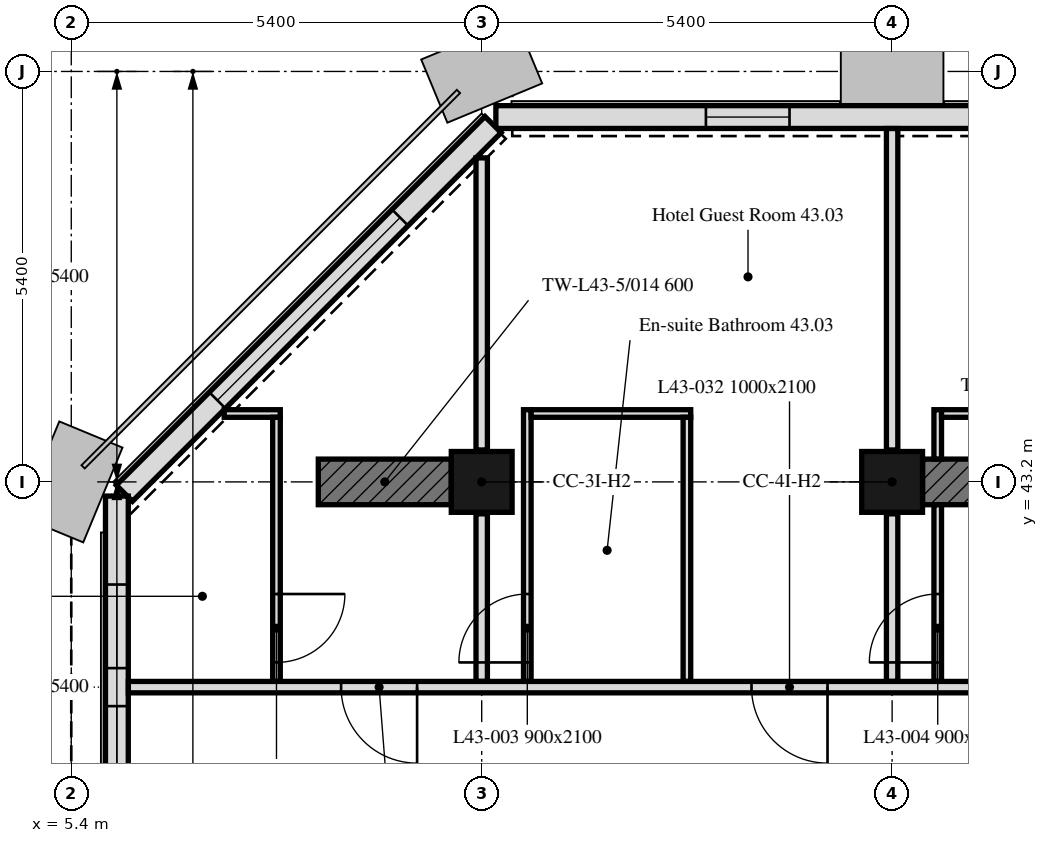
"""IFC4 building model, lengths in metres.
Left out: names, types, materials, properties, quantities, classifications, styles, units other than length and angle.
Written with IfcOpenShell. Run it as: python <this file> out.ifc"""

import sys

from ifc_helpers import new_model, si_unit, direction, frame, frame_2d, origin, origin_2d, place, context, subcontext, project, spatial, rectangle, extrude, element, fill, save


model = new_model("IFC4")
c1 = context("Model", 3, precision=1e-05, world=origin(), true_north=direction((0.0, 1.0)))
c2 = subcontext(c1, "Body", "Model", "MODEL_VIEW")
j1 = project(units=[si_unit("LENGTHUNIT", "METRE"), si_unit("PLANEANGLEUNIT", "RADIAN")], contexts=[c1])
p1 = place(None, origin())
s1 = spatial("IfcSite", under=j1, at=p1, CompositionType="ELEMENT")
p2 = place(p1, origin())
s2 = spatial("IfcBuilding", under=s1, at=p2, CompositionType="ELEMENT")
p3 = place(p2, frame((0.0, 0.0, 180.7)))
s3 = spatial("IfcBuildingStorey", under=s2, at=p3, CompositionType="ELEMENT", Elevation=180.7)
for number, where, z_axis, x_axis in (
    (1, (10.8, 43.2, 0.0), (0.0, 0.0, 1.0), (1.0, 0.0, 0.0)),
    (2, (16.2, 43.2, 0.0), (0.0, 0.0, 1.0), (1.0, 0.0, 0.0)),
):
    element("IfcColumn", number, at=place(p3, frame(where, z_axis=z_axis, x_axis=x_axis)), inside=s3, PredefinedType="COLUMN", context=c2, shape_type="SweptSolid", body=[
        extrude(rectangle(XDim=0.8, YDim=0.8, at=origin_2d()), origin(), (0.0, 0.0, 1.0), 3.0),
    ])
p4 = place(p3, frame((8.65, 43.2, 0.0), z_axis=(0.0, 0.0, 1.0), x_axis=(1.0, 0.0, 0.0)))
e3 = element("IfcWall", 3, at=p4, inside=s3, PredefinedType="SHEAR", context=c2, shape_type="SweptSolid", body=[
    extrude(rectangle(XDim=1.75, YDim=0.6, at=frame_2d((0.875, 0.0))), origin(), (0.0, 0.0, 1.0), 3.0),
])
p5 = place(p3, frame((16.6, 43.2, 0.0), z_axis=(0.0, 0.0, 1.0), x_axis=(1.0, 0.0, 0.0)))
e4 = element("IfcWall", 4, at=p5, inside=s3, PredefinedType="SHEAR", context=c2, shape_type="SweptSolid", body=[
    extrude(rectangle(XDim=1.55, YDim=0.6, at=frame_2d((0.775, 0.0))), origin(), (0.0, 0.0, 1.0), 3.0),
])
p6 = place(p3, frame((43.014, 48.0, 0.0), z_axis=(0.0, 0.0, 1.0), x_axis=(-1.0, 0.0, 0.0)))
e5 = element("IfcWall", 5, at=p6, inside=s3, PredefinedType="SOLIDWALL", context=c2, shape_type="SweptSolid", body=[
    extrude(rectangle(XDim=32.027, YDim=0.3, at=frame_2d((16.014, 0.0))), origin(), (0.0, 0.0, 1.0), 3.0),
])
p7 = place(p6, frame((0.814, 0.0, 0.9)))
e6 = element("IfcOpeningElement", 6, at=p7, cuts=e5, PredefinedType="OPENING", context=c2, shape_type="SweptSolid", body=[
    extrude(rectangle(XDim=3.4, YDim=1.7, at=frame_2d((1.7, 0.85))), frame((0.0, 0.16, 0.0), z_axis=(0.0, -1.0, 0.0), x_axis=(1.0, 0.0, 0.0)), (0.0, 0.0, 1.0), 0.32),
])
p8 = place(p6, frame((7.664, 0.0, 0.9)))
e7 = element("IfcOpeningElement", 7, at=p8, cuts=e5, PredefinedType="OPENING", context=c2, shape_type="SweptSolid", body=[
    extrude(rectangle(XDim=0.5, YDim=1.7, at=frame_2d((0.25, 0.85))), frame((0.0, 0.16, 0.0), z_axis=(0.0, -1.0, 0.0), x_axis=(1.0, 0.0, 0.0)), (0.0, 0.0, 1.0), 0.32),
])
p9 = place(p6, frame((13.064, 0.0, 0.9)))
e8 = element("IfcOpeningElement", 8, at=p9, cuts=e5, PredefinedType="OPENING", context=c2, shape_type="SweptSolid", body=[
    extrude(rectangle(XDim=0.5, YDim=1.7, at=frame_2d((0.25, 0.85))), frame((0.0, 0.16, 0.0), z_axis=(0.0, -1.0, 0.0), x_axis=(1.0, 0.0, 0.0)), (0.0, 0.0, 1.0), 0.32),
])
p10 = place(p6, frame((18.464, 0.0, 0.9)))
e9 = element("IfcOpeningElement", 9, at=p10, cuts=e5, PredefinedType="OPENING", context=c2, shape_type="SweptSolid", body=[
    extrude(rectangle(XDim=0.5, YDim=1.7, at=frame_2d((0.25, 0.85))), frame((0.0, 0.16, 0.0), z_axis=(0.0, -1.0, 0.0), x_axis=(1.0, 0.0, 0.0)), (0.0, 0.0, 1.0), 0.32),
])
p11 = place(p6, frame((23.864, 0.0, 0.9)))
e10 = element("IfcOpeningElement", 10, at=p11, cuts=e5, PredefinedType="OPENING", context=c2, shape_type="SweptSolid", body=[
    extrude(rectangle(XDim=0.5, YDim=1.7, at=frame_2d((0.25, 0.85))), frame((0.0, 0.16, 0.0), z_axis=(0.0, -1.0, 0.0), x_axis=(1.0, 0.0, 0.0)), (0.0, 0.0, 1.0), 0.32),
])
p12 = place(p6, frame((28.164, 0.0, 0.9)))
e11 = element("IfcOpeningElement", 11, at=p12, cuts=e5, PredefinedType="OPENING", context=c2, shape_type="SweptSolid", body=[
    extrude(rectangle(XDim=1.1, YDim=1.7, at=frame_2d((0.55, 0.85))), frame((0.0, 0.16, 0.0), z_axis=(0.0, -1.0, 0.0), x_axis=(1.0, 0.0, 0.0)), (0.0, 0.0, 1.0), 0.32),
])
p13 = place(p3, frame((10.949, 47.901, 0.0), z_axis=(0.0, 0.0, 1.0), x_axis=(-0.707106781187, -0.707106781187, 0.0)))
e12 = element("IfcWall", 12, at=p13, inside=s3, PredefinedType="SOLIDWALL", context=c2, shape_type="SweptSolid", body=[
    extrude(rectangle(XDim=6.86, YDim=0.3, at=frame_2d((3.43, 0.0))), origin(), (0.0, 0.0, 1.0), 3.0),
])
p14 = place(p13, frame((1.73, 0.0, 0.9)))
e13 = element("IfcOpeningElement", 13, at=p14, cuts=e12, PredefinedType="OPENING", context=c2, shape_type="SweptSolid", body=[
    extrude(rectangle(XDim=3.4, YDim=1.7, at=frame_2d((1.7, 0.85))), frame((0.0, 0.16, 0.0), z_axis=(0.0, -1.0, 0.0), x_axis=(1.0, 0.0, 0.0)), (0.0, 0.0, 1.0), 0.32),
])
p15 = place(p3, frame((6.0, 43.014, 0.0), z_axis=(0.0, 0.0, 1.0), x_axis=(0.0, -1.0, 0.0)))
e14 = element("IfcWall", 14, at=p15, inside=s3, PredefinedType="SOLIDWALL", context=c2, shape_type="SweptSolid", body=[
    extrude(rectangle(XDim=10.614, YDim=0.3, at=frame_2d((5.307, 0.0))), origin(), (0.0, 0.0, 1.0), 3.0),
])
p16 = place(p15, frame((1.164, 0.0, 0.9)))
e15 = element("IfcOpeningElement", 15, at=p16, cuts=e14, PredefinedType="OPENING", context=c2, shape_type="SweptSolid", body=[
    extrude(rectangle(XDim=1.1, YDim=1.7, at=frame_2d((0.55, 0.85))), frame((0.0, 0.16, 0.0), z_axis=(0.0, -1.0, 0.0), x_axis=(1.0, 0.0, 0.0)), (0.0, 0.0, 1.0), 0.32),
])
p17 = place(p15, frame((2.764, 0.0, 0.9)))
e16 = element("IfcOpeningElement", 16, at=p17, cuts=e14, PredefinedType="OPENING", context=c2, shape_type="SweptSolid", body=[
    extrude(rectangle(XDim=1.1, YDim=1.7, at=frame_2d((0.55, 0.85))), frame((0.0, 0.16, 0.0), z_axis=(0.0, -1.0, 0.0), x_axis=(1.0, 0.0, 0.0)), (0.0, 0.0, 1.0), 0.32),
])
p18 = place(p15, frame((6.564, 0.0, 0.9)))
e17 = element("IfcOpeningElement", 17, at=p18, cuts=e14, PredefinedType="OPENING", context=c2, shape_type="SweptSolid", body=[
    extrude(rectangle(XDim=1.1, YDim=1.7, at=frame_2d((0.55, 0.85))), frame((0.0, 0.16, 0.0), z_axis=(0.0, -1.0, 0.0), x_axis=(1.0, 0.0, 0.0)), (0.0, 0.0, 1.0), 0.32),
])
p19 = place(p15, frame((8.164, 0.0, 0.9)))
e18 = element("IfcOpeningElement", 18, at=p19, cuts=e14, PredefinedType="OPENING", context=c2, shape_type="SweptSolid", body=[
    extrude(rectangle(XDim=1.1, YDim=1.7, at=frame_2d((0.55, 0.85))), frame((0.0, 0.16, 0.0), z_axis=(0.0, -1.0, 0.0), x_axis=(1.0, 0.0, 0.0)), (0.0, 0.0, 1.0), 0.32),
])
p20 = place(p3, frame((10.8, 40.575, 0.0), z_axis=(0.0, 0.0, 1.0), x_axis=(0.0, 1.0, 0.0)))
e19 = element("IfcWall", 19, at=p20, inside=s3, PredefinedType="PARTITIONING", context=c2, shape_type="SweptSolid", body=[
    extrude(rectangle(XDim=2.205, YDim=0.15, at=frame_2d((1.103, 0.0))), origin(), (0.0, 0.0, 1.0), 3.0),
])
p21 = place(p3, frame((10.8, 43.62, 0.0), z_axis=(0.0, 0.0, 1.0), x_axis=(0.0, 1.0, 0.0)))
e20 = element("IfcWall", 20, at=p21, inside=s3, PredefinedType="PARTITIONING", context=c2, shape_type="SweptSolid", body=[
    extrude(rectangle(XDim=3.843, YDim=0.15, at=frame_2d((1.921, 0.0))), origin(), (0.0, 0.0, 1.0), 3.0),
])
p22 = place(p3, frame((7.412, 44.1, 0.0), z_axis=(0.0, 0.0, 1.0), x_axis=(1.0, 0.0, 0.0)))
e21 = element("IfcWall", 21, at=p22, inside=s3, PredefinedType="PARTITIONING", context=c2, shape_type="SweptSolid", body=[
    extrude(rectangle(XDim=0.738, YDim=0.1, at=frame_2d((0.369, 0.0))), origin(), (0.0, 0.0, 1.0), 3.0),
])
p23 = place(p3, frame((8.1, 44.05, 0.0), z_axis=(0.0, 0.0, 1.0), x_axis=(0.0, -1.0, 0.0)))
e22 = element("IfcWall", 22, at=p23, inside=s3, PredefinedType="PARTITIONING", context=c2, shape_type="SweptSolid", body=[
    extrude(rectangle(XDim=3.475, YDim=0.1, at=frame_2d((1.738, 0.0))), origin(), (0.0, 0.0, 1.0), 3.0),
])
p24 = place(p23, frame((2.325, 0.0, 0.0)))
e23 = element("IfcOpeningElement", 23, at=p24, cuts=e22, PredefinedType="OPENING", context=c2, shape_type="SweptSolid", body=[
    extrude(rectangle(XDim=0.9, YDim=2.1, at=frame_2d((0.45, 1.05))), frame((0.0, 0.05, 0.0), z_axis=(0.0, -1.0, 0.0), x_axis=(1.0, 0.0, 0.0)), (0.0, 0.0, 1.0), 0.1),
])
p25 = place(p3, frame((16.2, 40.575, 0.0), z_axis=(0.0, 0.0, 1.0), x_axis=(0.0, 1.0, 0.0)))
e24 = element("IfcWall", 24, at=p25, inside=s3, PredefinedType="PARTITIONING", context=c2, shape_type="SweptSolid", body=[
    extrude(rectangle(XDim=2.205, YDim=0.15, at=frame_2d((1.103, 0.0))), origin(), (0.0, 0.0, 1.0), 2.4),
])
p26 = place(p3, frame((16.2, 43.62, 0.0), z_axis=(0.0, 0.0, 1.0), x_axis=(0.0, 1.0, 0.0)))
e25 = element("IfcWall", 25, at=p26, inside=s3, PredefinedType="PARTITIONING", context=c2, shape_type="SweptSolid", body=[
    extrude(rectangle(XDim=4.229, YDim=0.15, at=frame_2d((2.115, 0.0))), origin(), (0.0, 0.0, 1.0), 2.4),
])
p27 = place(p3, frame((11.4, 40.575, 0.0), z_axis=(0.0, 0.0, 1.0), x_axis=(0.0, 1.0, 0.0)))
e26 = element("IfcWall", 26, at=p27, inside=s3, PredefinedType="PARTITIONING", context=c2, shape_type="SweptSolid", body=[
    extrude(rectangle(XDim=3.575, YDim=0.1, at=frame_2d((1.788, 0.0))), origin(), (0.0, 0.0, 1.0), 3.0),
])
p28 = place(p27, frame((0.25, 0.0, 0.0)))
e27 = element("IfcOpeningElement", 27, at=p28, cuts=e26, PredefinedType="OPENING", context=c2, shape_type="SweptSolid", body=[
    extrude(rectangle(XDim=0.9, YDim=2.1, at=frame_2d((0.45, 1.05))), frame((0.0, 0.05, 0.0), z_axis=(0.0, -1.0, 0.0), x_axis=(1.0, 0.0, 0.0)), (0.0, 0.0, 1.0), 0.1),
])
p29 = place(p3, frame((11.45, 44.1, 0.0), z_axis=(0.0, 0.0, 1.0), x_axis=(1.0, 0.0, 0.0)))
e28 = element("IfcWall", 28, at=p29, inside=s3, PredefinedType="PARTITIONING", context=c2, shape_type="SweptSolid", body=[
    extrude(rectangle(XDim=2.1, YDim=0.1, at=frame_2d((1.05, 0.0))), origin(), (0.0, 0.0, 1.0), 3.0),
])
p30 = place(p3, frame((13.5, 44.05, 0.0), z_axis=(0.0, 0.0, 1.0), x_axis=(0.0, -1.0, 0.0)))
e29 = element("IfcWall", 29, at=p30, inside=s3, PredefinedType="PARTITIONING", context=c2, shape_type="SweptSolid", body=[
    extrude(rectangle(XDim=3.475, YDim=0.1, at=frame_2d((1.738, 0.0))), origin(), (0.0, 0.0, 1.0), 3.0),
])
p31 = place(p3, frame((16.8, 40.575, 0.0), z_axis=(0.0, 0.0, 1.0), x_axis=(0.0, 1.0, 0.0)))
e30 = element("IfcWall", 30, at=p31, inside=s3, PredefinedType="PARTITIONING", context=c2, shape_type="SweptSolid", body=[
    extrude(rectangle(XDim=2.324, YDim=0.1, at=frame_2d((1.162, 0.0))), origin(), (0.0, 0.0, 1.0), 3.0),
])
p32 = place(p31, frame((0.25, 0.0, 0.0)))
e31 = element("IfcOpeningElement", 31, at=p32, cuts=e30, PredefinedType="OPENING", context=c2, shape_type="SweptSolid", body=[
    extrude(rectangle(XDim=0.9, YDim=2.1, at=frame_2d((0.45, 1.05))), frame((0.0, 0.05, 0.0), z_axis=(0.0, -1.0, 0.0), x_axis=(1.0, 0.0, 0.0)), (0.0, 0.0, 1.0), 0.1),
])
p33 = place(p3, frame((16.8, 43.501, 0.0), z_axis=(0.0, 0.0, 1.0), x_axis=(0.0, 1.0, 0.0)))
e32 = element("IfcWall", 32, at=p33, inside=s3, PredefinedType="PARTITIONING", context=c2, shape_type="SweptSolid", body=[
    extrude(rectangle(XDim=0.649, YDim=0.1, at=frame_2d((0.324, 0.0))), origin(), (0.0, 0.0, 1.0), 3.0),
])
p34 = place(p3, frame((16.85, 44.1, 0.0), z_axis=(0.0, 0.0, 1.0), x_axis=(1.0, 0.0, 0.0)))
e33 = element("IfcWall", 33, at=p34, inside=s3, PredefinedType="PARTITIONING", context=c2, shape_type="SweptSolid", body=[
    extrude(rectangle(XDim=2.1, YDim=0.1, at=frame_2d((1.05, 0.0))), origin(), (0.0, 0.0, 1.0), 3.0),
])
p35 = place(p3, frame((47.849, 40.5, 0.0), z_axis=(0.0, 0.0, 1.0), x_axis=(-1.0, 0.0, 0.0)))
e34 = element("IfcWall", 34, at=p35, inside=s3, PredefinedType="PARTITIONING", context=c2, shape_type="SweptSolid", body=[
    extrude(rectangle(XDim=41.698, YDim=0.15, at=frame_2d((20.849, 0.0))), origin(), (0.0, 0.0, 1.0), 2.4),
])
p36 = place(p35, frame((37.899, 0.0, 0.0)))
e35 = element("IfcOpeningElement", 35, at=p36, cuts=e34, PredefinedType="OPENING", context=c2, shape_type="SweptSolid", body=[
    extrude(rectangle(XDim=1.0, YDim=2.1, at=frame_2d((0.5, 1.05))), frame((0.0, 0.075, 0.0), z_axis=(0.0, -1.0, 0.0), x_axis=(1.0, 0.0, 0.0)), (0.0, 0.0, 1.0), 0.15),
])
p37 = place(p35, frame((32.499, 0.0, 0.0)))
e36 = element("IfcOpeningElement", 36, at=p37, cuts=e34, PredefinedType="OPENING", context=c2, shape_type="SweptSolid", body=[
    extrude(rectangle(XDim=1.0, YDim=2.1, at=frame_2d((0.5, 1.05))), frame((0.0, 0.075, 0.0), z_axis=(0.0, -1.0, 0.0), x_axis=(1.0, 0.0, 0.0)), (0.0, 0.0, 1.0), 0.15),
])
p38 = place(p35, frame((27.099, 0.0, 0.0)))
e37 = element("IfcOpeningElement", 37, at=p38, cuts=e34, PredefinedType="OPENING", context=c2, shape_type="SweptSolid", body=[
    extrude(rectangle(XDim=1.0, YDim=2.1, at=frame_2d((0.5, 1.05))), frame((0.0, 0.075, 0.0), z_axis=(0.0, -1.0, 0.0), x_axis=(1.0, 0.0, 0.0)), (0.0, 0.0, 1.0), 0.15),
])
p39 = place(p35, frame((21.699, 0.0, 0.0)))
e38 = element("IfcOpeningElement", 38, at=p39, cuts=e34, PredefinedType="OPENING", context=c2, shape_type="SweptSolid", body=[
    extrude(rectangle(XDim=1.0, YDim=2.1, at=frame_2d((0.5, 1.05))), frame((0.0, 0.075, 0.0), z_axis=(0.0, -1.0, 0.0), x_axis=(1.0, 0.0, 0.0)), (0.0, 0.0, 1.0), 0.15),
])
p40 = place(p35, frame((16.299, 0.0, 0.0)))
e39 = element("IfcOpeningElement", 39, at=p40, cuts=e34, PredefinedType="OPENING", context=c2, shape_type="SweptSolid", body=[
    extrude(rectangle(XDim=1.0, YDim=2.1, at=frame_2d((0.5, 1.05))), frame((0.0, 0.075, 0.0), z_axis=(0.0, -1.0, 0.0), x_axis=(1.0, 0.0, 0.0)), (0.0, 0.0, 1.0), 0.15),
])
p41 = place(p35, frame((10.899, 0.0, 0.0)))
e40 = element("IfcOpeningElement", 40, at=p41, cuts=e34, PredefinedType="OPENING", context=c2, shape_type="SweptSolid", body=[
    extrude(rectangle(XDim=1.0, YDim=2.1, at=frame_2d((0.5, 1.05))), frame((0.0, 0.075, 0.0), z_axis=(0.0, -1.0, 0.0), x_axis=(1.0, 0.0, 0.0)), (0.0, 0.0, 1.0), 0.15),
])
p42 = place(p35, frame((2.744, 0.0, 0.0)))
e41 = element("IfcOpeningElement", 41, at=p42, cuts=e34, PredefinedType="OPENING", context=c2, shape_type="SweptSolid", body=[
    extrude(rectangle(XDim=1.0, YDim=2.1, at=frame_2d((0.5, 1.05))), frame((0.0, 0.075, 0.0), z_axis=(0.0, -1.0, 0.0), x_axis=(1.0, 0.0, 0.0)), (0.0, 0.0, 1.0), 0.15),
])
p43 = place(p12, origin())
e42 = element("IfcWindow", 42, at=p43, inside=s3, PartitioningType="SINGLE_PANEL", PredefinedType="WINDOW", context=c2, shape_type="SweptSolid", body=[
    extrude(rectangle(XDim=1.1, YDim=1.7, at=frame_2d((0.55, 0.85))), frame((0.0, 0.03, 0.0), z_axis=(0.0, -1.0, 0.0), x_axis=(1.0, 0.0, 0.0)), (0.0, 0.0, 1.0), 0.06),
])
fill(e11, e42)
p44 = place(p14, origin())
e43 = element("IfcWindow", 43, at=p44, inside=s3, PartitioningType="SINGLE_PANEL", PredefinedType="WINDOW", context=c2, shape_type="SweptSolid", body=[
    extrude(rectangle(XDim=3.4, YDim=1.7, at=frame_2d((1.7, 0.85))), frame((0.0, 0.03, 0.0), z_axis=(0.0, -1.0, 0.0), x_axis=(1.0, 0.0, 0.0)), (0.0, 0.0, 1.0), 0.06),
])
fill(e13, e43)
p45 = place(p16, origin())
e44 = element("IfcWindow", 44, at=p45, inside=s3, PartitioningType="SINGLE_PANEL", PredefinedType="WINDOW", context=c2, shape_type="SweptSolid", body=[
    extrude(rectangle(XDim=1.1, YDim=1.7, at=frame_2d((0.55, 0.85))), frame((0.0, 0.03, 0.0), z_axis=(0.0, -1.0, 0.0), x_axis=(1.0, 0.0, 0.0)), (0.0, 0.0, 1.0), 0.06),
])
fill(e15, e44)
p46 = place(p17, origin())
e45 = element("IfcWindow", 45, at=p46, inside=s3, PartitioningType="SINGLE_PANEL", PredefinedType="WINDOW", context=c2, shape_type="SweptSolid", body=[
    extrude(rectangle(XDim=1.1, YDim=1.7, at=frame_2d((0.55, 0.85))), frame((0.0, 0.03, 0.0), z_axis=(0.0, -1.0, 0.0), x_axis=(1.0, 0.0, 0.0)), (0.0, 0.0, 1.0), 0.06),
])
fill(e16, e45)
p47 = place(p24, origin())
e46 = element("IfcDoor", 46, at=p47, inside=s3, OperationType="SINGLE_SWING_LEFT", PredefinedType="DOOR", context=c2, shape_type="SweptSolid", body=[
    extrude(rectangle(XDim=0.9, YDim=2.1, at=frame_2d((0.45, 1.05))), frame((0.0, 0.025, 0.0), z_axis=(0.0, -1.0, 0.0), x_axis=(1.0, 0.0, 0.0)), (0.0, 0.0, 1.0), 0.05),
])
fill(e23, e46)
p48 = place(p28, origin())
e47 = element("IfcDoor", 47, at=p48, inside=s3, OperationType="SINGLE_SWING_LEFT", PredefinedType="DOOR", context=c2, shape_type="SweptSolid", body=[
    extrude(rectangle(XDim=0.9, YDim=2.1, at=frame_2d((0.45, 1.05))), frame((0.0, 0.025, 0.0), z_axis=(0.0, -1.0, 0.0), x_axis=(1.0, 0.0, 0.0)), (0.0, 0.0, 1.0), 0.05),
])
fill(e27, e47)
p49 = place(p32, origin())
e48 = element("IfcDoor", 48, at=p49, inside=s3, OperationType="SINGLE_SWING_RIGHT", PredefinedType="DOOR", context=c2, shape_type="SweptSolid", body=[
    extrude(rectangle(XDim=0.9, YDim=2.1, at=frame_2d((0.45, 1.05))), frame((0.0, 0.025, 0.0), z_axis=(0.0, -1.0, 0.0), x_axis=(1.0, 0.0, 0.0)), (0.0, 0.0, 1.0), 0.05),
])
fill(e31, e48)
p50 = place(p36, origin())
e49 = element("IfcDoor", 49, at=p50, inside=s3, OperationType="SINGLE_SWING_LEFT", PredefinedType="DOOR", context=c2, shape_type="SweptSolid", body=[
    extrude(rectangle(XDim=1.0, YDim=2.1, at=frame_2d((0.5, 1.05))), frame((0.0, 0.025, 0.0), z_axis=(0.0, -1.0, 0.0), x_axis=(1.0, 0.0, 0.0)), (0.0, 0.0, 1.0), 0.05),
])
fill(e35, e49)
p51 = place(p37, origin())
e50 = element("IfcDoor", 50, at=p51, inside=s3, OperationType="SINGLE_SWING_RIGHT", PredefinedType="DOOR", context=c2, shape_type="SweptSolid", body=[
    extrude(rectangle(XDim=1.0, YDim=2.1, at=frame_2d((0.5, 1.05))), frame((0.0, 0.025, 0.0), z_axis=(0.0, -1.0, 0.0), x_axis=(1.0, 0.0, 0.0)), (0.0, 0.0, 1.0), 0.05),
])
fill(e36, e50)
save(model, sys.argv[1])
